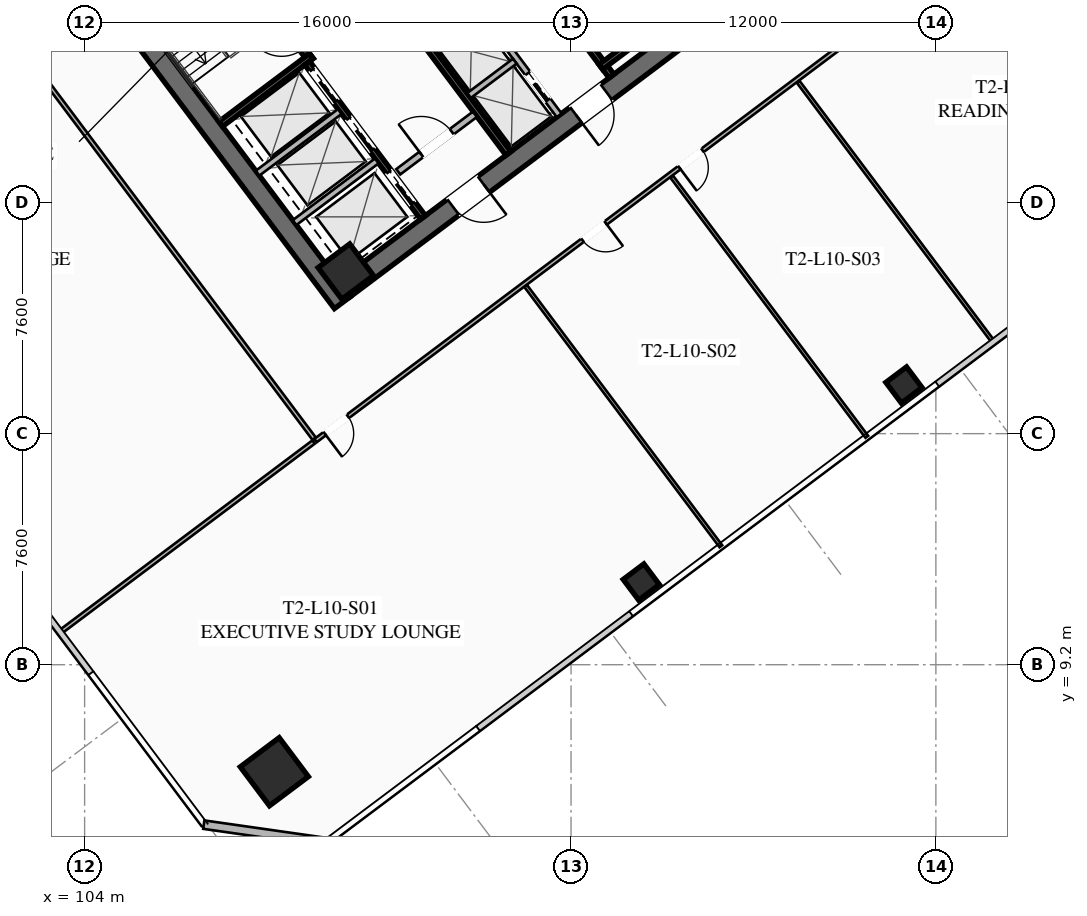
"""IFC4 building model, lengths in metres.
Left out: names, types, materials, properties, quantities, classifications, styles, units other than length and angle.
Written with IfcOpenShell. Run it as: python <this file> out.ifc"""

import sys

from ifc_helpers import new_model, si_unit, direction, frame, frame_2d, origin, origin_2d, place, context, subcontext, project, spatial, rectangle, hollow_rectangle, extrude, element, fill, save


model = new_model("IFC4")
c1 = context("Model", 3, precision=1e-05, world=origin(), true_north=direction((0.0, 1.0)))
c2 = subcontext(c1, "Body", "Model", "MODEL_VIEW")
j1 = project(units=[si_unit("LENGTHUNIT", "METRE"), si_unit("PLANEANGLEUNIT", "RADIAN")], contexts=[c1])
p1 = place(None, origin())
s1 = spatial("IfcSite", under=j1, at=p1, CompositionType="ELEMENT")
p2 = place(p1, origin())
s2 = spatial("IfcBuilding", under=s1, at=p2, CompositionType="ELEMENT")
p3 = place(p2, frame((0.0, 0.0, 42.35)))
s3 = spatial("IfcBuildingStorey", under=s2, at=p3, CompositionType="ELEMENT", Elevation=42.35)
p4 = place(p3, frame((112.476, 21.107, 0.0), z_axis=(0.0, 0.0, 1.0), x_axis=(-0.600005007985, 0.799996243986, 0.0)))
e1 = element("IfcWall", 1, at=p4, inside=s3, PredefinedType="SHEAR", context=c2, shape_type="SweptSolid", body=[
    extrude(rectangle(XDim=15.6, YDim=0.65, at=frame_2d((7.8, 0.0))), origin(), (0.0, 0.0, 1.0), 3.55),
])
p5 = place(p3, frame((124.429, 30.478, 0.0), z_axis=(0.0, 0.0, 1.0), x_axis=(-0.799998028465, -0.600002628705, 0.0)))
e2 = element("IfcWall", 2, at=p5, inside=s3, PredefinedType="SHEAR", context=c2, shape_type="SweptSolid", body=[
    extrude(rectangle(XDim=14.86, YDim=0.65, at=frame_2d((7.43, 0.0))), origin(), (0.0, 0.0, 1.0), 3.55),
])
p6 = place(p5, frame((9.13, 0.0, 0.0)))
e3 = element("IfcOpeningElement", 3, at=p6, cuts=e2, PredefinedType="OPENING", context=c2, shape_type="SweptSolid", body=[
    extrude(rectangle(XDim=1.25, YDim=2.25, at=frame_2d((0.625, 1.125))), frame((0.0, 0.335, 0.0), z_axis=(0.0, -1.0, 0.0), x_axis=(1.0, 0.0, 0.0)), (0.0, 0.0, 1.0), 0.67),
])
p7 = place(p5, frame((4.08, 0.0, 0.0)))
e4 = element("IfcOpeningElement", 4, at=p7, cuts=e2, PredefinedType="OPENING", context=c2, shape_type="SweptSolid", body=[
    extrude(rectangle(XDim=1.25, YDim=2.25, at=frame_2d((0.625, 1.125))), frame((0.0, 0.335, 0.0), z_axis=(0.0, -1.0, 0.0), x_axis=(1.0, 0.0, 0.0)), (0.0, 0.0, 1.0), 0.67),
])
p8 = place(p3, frame((112.59, 22.13, 0.0), z_axis=(0.0, 0.0, 1.0), x_axis=(0.799999996291, 0.600000004945, 0.0)))
e5 = element("IfcColumn", 5, at=p8, inside=s3, PredefinedType="COLUMN", context=c2, shape_type="SweptSolid", body=[
    extrude(hollow_rectangle(XDim=1.3, YDim=1.3, WallThickness=0.05, at=origin_2d()), origin(), (0.0, 0.0, 1.0), 3.35),
])
p9 = place(p3, frame((110.24, 5.68, 0.0), z_axis=(0.0, 0.0, 1.0), x_axis=(0.799999996291, 0.600000004945, 0.0)))
e6 = element("IfcColumn", 6, at=p9, inside=s3, PredefinedType="COLUMN", context=c2, shape_type="SweptSolid", body=[
    extrude(hollow_rectangle(XDim=1.6, YDim=1.6, WallThickness=0.06, at=origin_2d()), origin(), (0.0, 0.0, 1.0), 3.35),
])
for number, where, z_axis, x_axis in (
    (7, (122.31, 11.92, 0.0), (0.0, 0.0, 1.0), (0.8, 0.6, 0.0)),
    (8, (130.95, 18.4, 0.0), (0.0, 0.0, 1.0), (0.8, 0.6, 0.0)),
):
    element("IfcColumn", number, at=place(p3, frame(where, z_axis=z_axis, x_axis=x_axis)), inside=s3, PredefinedType="COLUMN", context=c2, shape_type="SweptSolid", body=[
        extrude(hollow_rectangle(XDim=0.85, YDim=0.85, WallThickness=0.035, at=origin_2d()), origin(), (0.0, 0.0, 1.0), 3.35),
    ])
p10 = place(p3, frame((111.98, 3.36, 0.0), z_axis=(0.0, 0.0, 1.0), x_axis=(-0.989955445613, 0.14137968631, 0.0)))
e9 = element("IfcWall", 9, at=p10, inside=s3, PredefinedType="SOLIDWALL", context=c2, shape_type="SweptSolid", body=[
    extrude(rectangle(XDim=4.101, YDim=0.28, at=frame_2d((2.051, 0.0))), origin(), (0.0, 0.0, 1.0), 3.35),
])
p11 = place(p3, frame((111.44, 29.08, 0.0), z_axis=(0.0, 0.0, 1.0), x_axis=(-0.600009827119, 0.799992629566, 0.0)))
e10 = element("IfcWall", 10, at=p11, inside=s3, PredefinedType="SHEAR", context=c2, shape_type="SweptSolid", body=[
    extrude(rectangle(XDim=7.95, YDim=0.2, at=frame_2d((3.975, 0.0))), origin(), (0.0, 0.0, 1.0), 3.35),
])
p12 = place(p11, frame((0.45, 0.0, 0.0)))
e11 = element("IfcOpeningElement", 11, at=p12, cuts=e10, PredefinedType="OPENING", context=c2, shape_type="SweptSolid", body=[
    extrude(rectangle(XDim=1.15, YDim=2.2, at=frame_2d((0.575, 1.1))), frame((0.0, 0.11, 0.0), z_axis=(0.0, -1.0, 0.0), x_axis=(1.0, 0.0, 0.0)), (0.0, 0.0, 1.0), 0.22),
])
p13 = place(p3, frame((108.476, 26.982, 0.0), z_axis=(0.0, 0.0, 1.0), x_axis=(0.799984290658, 0.600020945218, 0.0)))
e12 = element("IfcWall", 12, at=p13, inside=s3, PredefinedType="SHEAR", context=c2, shape_type="SweptSolid", body=[
    extrude(rectangle(XDim=3.73, YDim=0.2, at=frame_2d((1.865, 0.0))), origin(), (0.0, 0.0, 1.0), 3.35),
])
p14 = place(p3, frame((116.56, 34.92, 0.0), z_axis=(0.0, 0.0, 1.0), x_axis=(0.600009827119, -0.799992629566, 0.0)))
e13 = element("IfcWall", 13, at=p14, inside=s3, PredefinedType="SHEAR", context=c2, shape_type="SweptSolid", body=[
    extrude(rectangle(XDim=7.95, YDim=0.2, at=frame_2d((3.975, 0.0))), origin(), (0.0, 0.0, 1.0), 3.35),
])
p15 = place(p14, frame((0.45, 0.0, 0.0)))
e14 = element("IfcOpeningElement", 14, at=p15, cuts=e13, PredefinedType="OPENING", context=c2, shape_type="SweptSolid", body=[
    extrude(rectangle(XDim=1.15, YDim=2.2, at=frame_2d((0.575, 1.1))), frame((0.0, 0.11, 0.0), z_axis=(0.0, -1.0, 0.0), x_axis=(1.0, 0.0, 0.0)), (0.0, 0.0, 1.0), 0.22),
])
p16 = place(p3, frame((120.98, 28.86, 0.0), z_axis=(0.0, 0.0, 1.0), x_axis=(0.800039270442, 0.59994763584, 0.0)))
e15 = element("IfcWall", 15, at=p16, inside=s3, PredefinedType="SHEAR", context=c2, shape_type="SweptSolid", body=[
    extrude(rectangle(XDim=3.73, YDim=0.2, at=frame_2d((1.865, 0.0))), origin(), (0.0, 0.0, 1.0), 3.35),
])
p17 = place(p3, frame((117.938, 26.016, 0.0), z_axis=(0.0, 0.0, 1.0), x_axis=(-0.600005463273, 0.799995902516, 0.0)))
e16 = element("IfcWall", 16, at=p17, inside=s3, PredefinedType="SHEAR", context=c2, shape_type="SweptSolid", body=[
    extrude(rectangle(XDim=14.3, YDim=0.2, at=frame_2d((7.15, 0.0))), origin(), (0.0, 0.0, 1.0), 3.35),
])
p18 = place(p3, frame((114.316, 25.412, 0.0), z_axis=(0.0, 0.0, 1.0), x_axis=(0.800018601094, 0.59997519774, 0.0)))
e17 = element("IfcWall", 17, at=p18, inside=s3, PredefinedType="SOLIDWALL", context=c2, shape_type="SweptSolid", body=[
    extrude(rectangle(XDim=3.15, YDim=0.22, at=frame_2d((1.575, 0.0))), origin(), (0.0, 0.0, 1.0), 2.703),
])
p19 = place(p18, frame((0.95, 0.0, 0.0)))
e18 = element("IfcOpeningElement", 18, at=p19, cuts=e17, PredefinedType="OPENING", context=c2, shape_type="SweptSolid", body=[
    extrude(rectangle(XDim=1.25, YDim=2.25, at=frame_2d((0.625, 1.125))), frame((0.0, 0.12, 0.0), z_axis=(0.0, -1.0, 0.0), x_axis=(1.0, 0.0, 0.0)), (0.0, 0.0, 1.0), 0.24),
])
p20 = place(p3, frame((115.13, 23.91, 0.0), z_axis=(0.0, 0.0, 1.0), x_axis=(-0.599975393228, 0.800018454488, 0.0)))
e19 = element("IfcWall", 19, at=p20, inside=s3, PredefinedType="SHEAR", context=c2, shape_type="SweptSolid", body=[
    extrude(rectangle(XDim=6.35, YDim=0.2, at=frame_2d((3.175, 0.0))), origin(), (0.0, 0.0, 1.0), 3.35),
])
p21 = place(p20, frame((4.775, 0.0, 0.0)))
e20 = element("IfcOpeningElement", 20, at=p21, cuts=e19, PredefinedType="OPENING", context=c2, shape_type="SweptSolid", body=[
    extrude(rectangle(XDim=1.3, YDim=2.25, at=frame_2d((0.65, 1.125))), frame((0.0, 0.11, 0.0), z_axis=(0.0, -1.0, 0.0), x_axis=(1.0, 0.0, 0.0)), (0.0, 0.0, 1.0), 0.22),
])
p22 = place(p20, frame((2.775, 0.0, 0.0)))
e21 = element("IfcOpeningElement", 21, at=p22, cuts=e19, PredefinedType="OPENING", context=c2, shape_type="SweptSolid", body=[
    extrude(rectangle(XDim=1.3, YDim=2.25, at=frame_2d((0.65, 1.125))), frame((0.0, 0.11, 0.0), z_axis=(0.0, -1.0, 0.0), x_axis=(1.0, 0.0, 0.0)), (0.0, 0.0, 1.0), 0.22),
])
p23 = place(p20, frame((0.575, 0.0, 0.0)))
e22 = element("IfcOpeningElement", 22, at=p23, cuts=e19, PredefinedType="OPENING", context=c2, shape_type="SweptSolid", body=[
    extrude(rectangle(XDim=1.3, YDim=2.25, at=frame_2d((0.65, 1.125))), frame((0.0, 0.11, 0.0), z_axis=(0.0, -1.0, 0.0), x_axis=(1.0, 0.0, 0.0)), (0.0, 0.0, 1.0), 0.22),
])
for number, where, z_axis, x_axis in (
    (23, (110.906, 23.742, 0.0), (0.0, 0.0, 1.0), (0.8, 0.6, 0.0)),
    (24, (109.688, 25.366, 0.0), (0.0, 0.0, 1.0), (0.8, 0.6, 0.0)),
):
    element("IfcWall", number, at=place(p3, frame(where, z_axis=z_axis, x_axis=x_axis)), inside=s3, PredefinedType="SOLIDWALL", context=c2, shape_type="SweptSolid", body=[
        extrude(rectangle(XDim=3.38, YDim=0.2, at=frame_2d((1.69, 0.0))), origin(), (0.0, 0.0, 1.0), 3.35),
    ])
p24 = place(p3, frame((119.61, 27.27, 0.0), z_axis=(0.0, 0.0, 1.0), x_axis=(-0.600011488909, 0.79999138319, 0.0)))
e25 = element("IfcWall", 25, at=p24, inside=s3, PredefinedType="SOLIDWALL", context=c2, shape_type="SweptSolid", body=[
    extrude(rectangle(XDim=6.8, YDim=0.2, at=frame_2d((3.4, 0.0))), origin(), (0.0, 0.0, 1.0), 3.35),
])
p25 = place(p24, frame((0.625, 0.0, 0.0)))
e26 = element("IfcOpeningElement", 26, at=p25, cuts=e25, PredefinedType="OPENING", context=c2, shape_type="SweptSolid", body=[
    extrude(rectangle(XDim=1.1, YDim=2.2, at=frame_2d((0.55, 1.1))), frame((0.0, 0.11, 0.0), z_axis=(0.0, -1.0, 0.0), x_axis=(1.0, 0.0, 0.0)), (0.0, 0.0, 1.0), 0.22),
])
p26 = place(p24, frame((2.875, 0.0, 0.0)))
e27 = element("IfcOpeningElement", 27, at=p26, cuts=e25, PredefinedType="OPENING", context=c2, shape_type="SweptSolid", body=[
    extrude(rectangle(XDim=1.1, YDim=2.2, at=frame_2d((0.55, 1.1))), frame((0.0, 0.11, 0.0), z_axis=(0.0, -1.0, 0.0), x_axis=(1.0, 0.0, 0.0)), (0.0, 0.0, 1.0), 0.22),
])
p27 = place(p24, frame((5.125, 0.0, 0.0)))
e28 = element("IfcOpeningElement", 28, at=p27, cuts=e25, PredefinedType="OPENING", context=c2, shape_type="SweptSolid", body=[
    extrude(rectangle(XDim=1.1, YDim=2.2, at=frame_2d((0.55, 1.1))), frame((0.0, 0.11, 0.0), z_axis=(0.0, -1.0, 0.0), x_axis=(1.0, 0.0, 0.0)), (0.0, 0.0, 1.0), 0.22),
])
p28 = place(p3, frame((116.646, 27.922, 0.0), z_axis=(0.0, 0.0, 1.0), x_axis=(0.8, 0.6, 0.0)))
e29 = element("IfcWall", 29, at=p28, inside=s3, PredefinedType="SOLIDWALL", context=c2, shape_type="SweptSolid", body=[
    extrude(rectangle(XDim=1.88, YDim=0.2, at=frame_2d((0.94, 0.0))), origin(), (0.0, 0.0, 1.0), 3.35),
])
p29 = place(p3, frame((135.46, 34.47, 0.0), z_axis=(0.0, 0.0, 1.0), x_axis=(-0.800000982127, -0.599998690494, 0.0)))
e30 = element("IfcWall", 30, at=p29, inside=s3, PredefinedType="PARTITIONING", context=c2, shape_type="SweptSolid", body=[
    extrude(rectangle(XDim=29.83, YDim=0.135, at=frame_2d((14.915, 0.0))), origin(), (0.0, 0.0, 1.0), 2.703),
])
p30 = place(p29, frame((28.5, 0.0, 0.0)))
e31 = element("IfcOpeningElement", 31, at=p30, cuts=e30, PredefinedType="OPENING", context=c2, shape_type="SweptSolid", body=[
    extrude(rectangle(XDim=0.95, YDim=2.05, at=frame_2d((0.475, 1.025))), frame((0.0, 0.077, 0.0), z_axis=(0.0, -1.0, 0.0), x_axis=(1.0, 0.0, 0.0)), (0.0, 0.0, 1.0), 0.155),
])
p31 = place(p29, frame((17.901, 0.0, 0.0)))
e32 = element("IfcOpeningElement", 32, at=p31, cuts=e30, PredefinedType="OPENING", context=c2, shape_type="SweptSolid", body=[
    extrude(rectangle(XDim=0.95, YDim=2.05, at=frame_2d((0.475, 1.025))), frame((0.0, 0.077, 0.0), z_axis=(0.0, -1.0, 0.0), x_axis=(1.0, 0.0, 0.0)), (0.0, 0.0, 1.0), 0.155),
])
p32 = place(p29, frame((13.92, 0.0, 0.0)))
e33 = element("IfcOpeningElement", 33, at=p32, cuts=e30, PredefinedType="OPENING", context=c2, shape_type="SweptSolid", body=[
    extrude(rectangle(XDim=0.95, YDim=2.05, at=frame_2d((0.475, 1.025))), frame((0.0, 0.077, 0.0), z_axis=(0.0, -1.0, 0.0), x_axis=(1.0, 0.0, 0.0)), (0.0, 0.0, 1.0), 0.155),
])
p33 = place(p29, frame((0.38, 0.0, 0.0)))
e34 = element("IfcOpeningElement", 34, at=p33, cuts=e30, PredefinedType="OPENING", context=c2, shape_type="SweptSolid", body=[
    extrude(rectangle(XDim=0.95, YDim=2.05, at=frame_2d((0.475, 1.025))), frame((0.0, 0.077, 0.0), z_axis=(0.0, -1.0, 0.0), x_axis=(1.0, 0.0, 0.0)), (0.0, 0.0, 1.0), 0.155),
])
for number, where, z_axis, x_axis in (
    (35, (124.928, 13.096, 0.0), (0.0, 0.0, 1.0), (-0.6, 0.8, 0.0)),
    (36, (129.728, 16.696, 0.0), (0.0, 0.0, 1.0), (-0.6, 0.8, 0.0)),
    (37, (133.888, 19.816, 0.0), (0.0, 0.0, 1.0), (-0.6, 0.8, 0.0)),
):
    element("IfcWall", number, at=place(p3, frame(where, z_axis=z_axis, x_axis=x_axis)), inside=s3, PredefinedType="PARTITIONING", context=c2, shape_type="SweptSolid", body=[
        extrude(rectangle(XDim=10.7, YDim=0.11, at=frame_2d((5.35, 0.0))), origin(), (0.0, 0.0, 1.0), 2.703),
    ])
p34 = place(p3, frame((111.548, 16.636, 0.0), z_axis=(0.0, 0.0, 1.0), x_axis=(-0.600001746983, 0.79999868976, 0.0)))
e38 = element("IfcWall", 38, at=p34, inside=s3, PredefinedType="PARTITIONING", context=c2, shape_type="SweptSolid", body=[
    extrude(rectangle(XDim=22.36, YDim=0.135, at=frame_2d((11.18, 0.0))), origin(), (0.0, 0.0, 1.0), 2.703),
])
p35 = place(p34, frame((21.11, 0.0, 0.0)))
e39 = element("IfcOpeningElement", 39, at=p35, cuts=e38, PredefinedType="OPENING", context=c2, shape_type="SweptSolid", body=[
    extrude(rectangle(XDim=0.95, YDim=2.05, at=frame_2d((0.475, 1.025))), frame((0.0, 0.077, 0.0), z_axis=(0.0, -1.0, 0.0), x_axis=(1.0, 0.0, 0.0)), (0.0, 0.0, 1.0), 0.155),
])
p36 = place(p3, frame((103.196, 10.272, 0.0), z_axis=(0.0, 0.0, 1.0), x_axis=(0.8, 0.6, 0.0)))
e40 = element("IfcWall", 40, at=p36, inside=s3, PredefinedType="PARTITIONING", context=c2, shape_type="SweptSolid", body=[
    extrude(rectangle(XDim=10.42, YDim=0.135, at=frame_2d((5.21, 0.0))), origin(), (0.0, 0.0, 1.0), 2.703),
])
p37 = place(p6, origin())
e41 = element("IfcDoor", 41, at=p37, inside=s3, OperationType="SINGLE_SWING_LEFT", PredefinedType="DOOR", context=c2, shape_type="SweptSolid", body=[
    extrude(rectangle(XDim=1.25, YDim=2.25, at=frame_2d((0.625, 1.125))), frame((0.0, 0.025, 0.0), z_axis=(0.0, -1.0, 0.0), x_axis=(1.0, 0.0, 0.0)), (0.0, 0.0, 1.0), 0.05),
])
fill(e3, e41)
p38 = place(p7, origin())
e42 = element("IfcDoor", 42, at=p38, inside=s3, OperationType="SINGLE_SWING_RIGHT", PredefinedType="DOOR", context=c2, shape_type="SweptSolid", body=[
    extrude(rectangle(XDim=1.25, YDim=2.25, at=frame_2d((0.625, 1.125))), frame((0.0, 0.025, 0.0), z_axis=(0.0, -1.0, 0.0), x_axis=(1.0, 0.0, 0.0)), (0.0, 0.0, 1.0), 0.05),
])
fill(e4, e42)
p39 = place(p19, origin())
e43 = element("IfcDoor", 43, at=p39, inside=s3, OperationType="SINGLE_SWING_LEFT", PredefinedType="DOOR", context=c2, shape_type="SweptSolid", body=[
    extrude(rectangle(XDim=1.25, YDim=2.25, at=frame_2d((0.625, 1.125))), frame((0.0, 0.025, 0.0), z_axis=(0.0, -1.0, 0.0), x_axis=(1.0, 0.0, 0.0)), (0.0, 0.0, 1.0), 0.05),
])
fill(e18, e43)
p40 = place(p30, origin())
e44 = element("IfcDoor", 44, at=p40, inside=s3, OperationType="SINGLE_SWING_RIGHT", PredefinedType="DOOR", context=c2, shape_type="SweptSolid", body=[
    extrude(rectangle(XDim=0.95, YDim=2.05, at=frame_2d((0.475, 1.025))), frame((0.0, 0.025, 0.0), z_axis=(0.0, -1.0, 0.0), x_axis=(1.0, 0.0, 0.0)), (0.0, 0.0, 1.0), 0.05),
])
fill(e31, e44)
p41 = place(p31, origin())
e45 = element("IfcDoor", 45, at=p41, inside=s3, OperationType="SINGLE_SWING_LEFT", PredefinedType="DOOR", context=c2, shape_type="SweptSolid", body=[
    extrude(rectangle(XDim=0.95, YDim=2.05, at=frame_2d((0.475, 1.025))), frame((0.0, 0.025, 0.0), z_axis=(0.0, -1.0, 0.0), x_axis=(1.0, 0.0, 0.0)), (0.0, 0.0, 1.0), 0.05),
])
fill(e32, e45)
p42 = place(p32, origin())
e46 = element("IfcDoor", 46, at=p42, inside=s3, OperationType="SINGLE_SWING_RIGHT", PredefinedType="DOOR", context=c2, shape_type="SweptSolid", body=[
    extrude(rectangle(XDim=0.95, YDim=2.05, at=frame_2d((0.475, 1.025))), frame((0.0, 0.025, 0.0), z_axis=(0.0, -1.0, 0.0), x_axis=(1.0, 0.0, 0.0)), (0.0, 0.0, 1.0), 0.05),
])
fill(e33, e46)
p43 = place(p21, origin())
e47 = element("IfcDoor", 47, at=p43, inside=s3, OperationType="SLIDING_TO_LEFT", PredefinedType="DOOR", context=c2, shape_type="SweptSolid", body=[
    extrude(rectangle(XDim=1.3, YDim=2.25, at=frame_2d((0.65, 1.125))), frame((0.0, 0.025, 0.0), z_axis=(0.0, -1.0, 0.0), x_axis=(1.0, 0.0, 0.0)), (0.0, 0.0, 1.0), 0.05),
])
fill(e20, e47)
p44 = place(p22, origin())
e48 = element("IfcDoor", 48, at=p44, inside=s3, OperationType="SLIDING_TO_LEFT", PredefinedType="DOOR", context=c2, shape_type="SweptSolid", body=[
    extrude(rectangle(XDim=1.3, YDim=2.25, at=frame_2d((0.65, 1.125))), frame((0.0, 0.025, 0.0), z_axis=(0.0, -1.0, 0.0), x_axis=(1.0, 0.0, 0.0)), (0.0, 0.0, 1.0), 0.05),
])
fill(e21, e48)
p45 = place(p23, origin())
e49 = element("IfcDoor", 49, at=p45, inside=s3, OperationType="SLIDING_TO_LEFT", PredefinedType="DOOR", context=c2, shape_type="SweptSolid", body=[
    extrude(rectangle(XDim=1.3, YDim=2.25, at=frame_2d((0.65, 1.125))), frame((0.0, 0.025, 0.0), z_axis=(0.0, -1.0, 0.0), x_axis=(1.0, 0.0, 0.0)), (0.0, 0.0, 1.0), 0.05),
])
fill(e22, e49)
p46 = place(p25, origin())
e50 = element("IfcDoor", 50, at=p46, inside=s3, OperationType="SLIDING_TO_LEFT", PredefinedType="DOOR", context=c2, shape_type="SweptSolid", body=[
    extrude(rectangle(XDim=1.1, YDim=2.2, at=frame_2d((0.55, 1.1))), frame((0.0, 0.025, 0.0), z_axis=(0.0, -1.0, 0.0), x_axis=(1.0, 0.0, 0.0)), (0.0, 0.0, 1.0), 0.05),
])
fill(e26, e50)
save(model, sys.argv[1])
